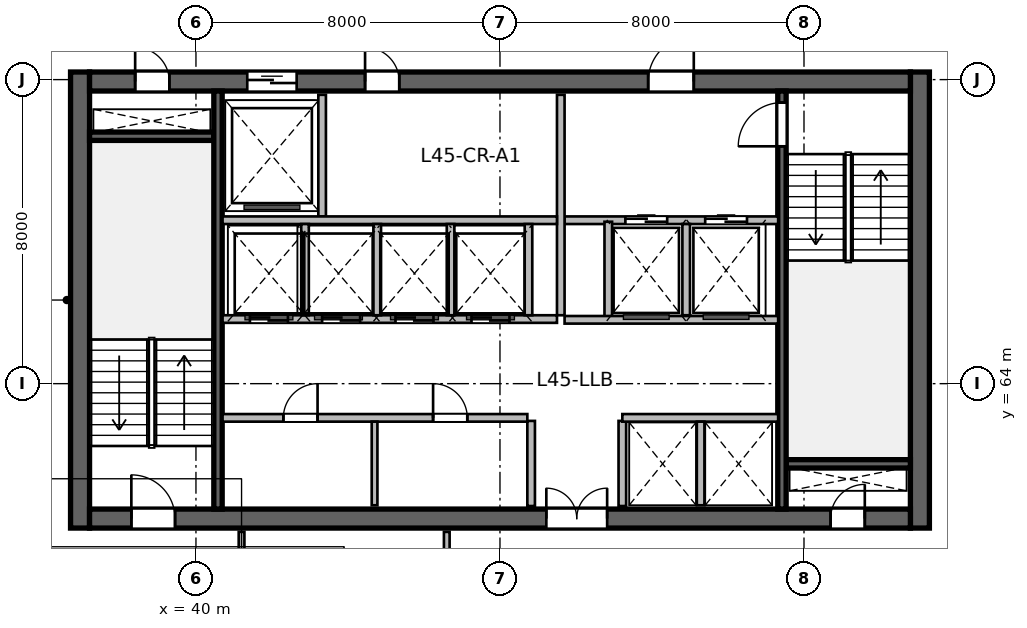
"""IFC4 building model, lengths in metres.
Left out: names, types, materials, properties, quantities, classifications, styles, units other than length and angle.
Written with IfcOpenShell. Run it as: python <this file> out.ifc"""

import sys

from ifc_helpers import new_model, si_unit, direction, frame, frame_2d, origin, place, context, subcontext, project, spatial, rectangle, extrude, source, transform, mapped, element, fill, save


model = new_model("IFC4")
c1 = context("Model", 3, precision=1e-05, world=origin(), true_north=direction((0.0, 1.0)))
c2 = subcontext(c1, "Body", "Model", "MODEL_VIEW")
j1 = project(units=[si_unit("LENGTHUNIT", "METRE"), si_unit("PLANEANGLEUNIT", "RADIAN")], contexts=[c1])
p1 = place(None, origin())
s1 = spatial("IfcSite", under=j1, at=p1, CompositionType="ELEMENT")
p2 = place(p1, origin())
s2 = spatial("IfcBuilding", under=s1, at=p2, CompositionType="ELEMENT")
p3 = place(p2, frame((0.0, 0.0, 185.7)))
s3 = spatial("IfcBuildingStorey", under=s2, at=p3, CompositionType="ELEMENT", Elevation=185.7)
m1 = source(origin(), c2, "Body", "SweptSolid", [
    extrude(rectangle(XDim=12.0, YDim=0.5, at=frame_2d((6.0, 0.0))), origin(), (0.0, 0.0, 1.0), 3.9),
])
for number, where, z_axis, x_axis in (
    (1, (36.95, 60.2, 0.0), (0.0, 0.0, 1.0), (0.0, 1.0, 0.0)),
    (2, (59.05, 60.2, 0.0), (0.0, 0.0, 1.0), (0.0, 1.0, 0.0)),
):
    element("IfcWall", number, at=place(p3, frame(where, z_axis=z_axis, x_axis=x_axis)), inside=s3, PredefinedType="SHEAR", context=c2, shape_type="MappedRepresentation", body=[
        mapped(m1, transform((0.0, 0.0, 0.0), scale=1.0)),
    ])
m2 = source(origin(), c2, "Body", "SweptSolid", [
    extrude(rectangle(XDim=21.6, YDim=0.5, at=frame_2d((10.8, 0.0))), origin(), (0.0, 0.0, 1.0), 3.9),
])
p4 = place(p3, frame((37.2, 60.45, 0.0), z_axis=(0.0, 0.0, 1.0), x_axis=(1.0, 0.0, 0.0)))
e3 = element("IfcWall", 3, at=p4, inside=s3, PredefinedType="SHEAR", context=c2, shape_type="MappedRepresentation", body=[
    mapped(m2, transform((0.0, 0.0, 0.0), scale=1.0)),
])
p5 = place(p4, frame((1.1, 0.0, 0.0)))
e4 = element("IfcOpeningElement", 4, at=p5, cuts=e3, PredefinedType="OPENING", context=c2, shape_type="SweptSolid", body=[
    extrude(rectangle(XDim=1.15, YDim=2.15, at=frame_2d((0.575, 1.075))), frame((0.0, 0.26, 0.0), z_axis=(0.0, -1.0, 0.0), x_axis=(1.0, 0.0, 0.0)), (0.0, 0.0, 1.0), 0.52),
])
p6 = place(p4, frame((19.5, 0.0, 0.0)))
e5 = element("IfcOpeningElement", 5, at=p6, cuts=e3, PredefinedType="OPENING", context=c2, shape_type="SweptSolid", body=[
    extrude(rectangle(XDim=0.9, YDim=2.1, at=frame_2d((0.45, 1.05))), frame((0.0, 0.26, 0.0), z_axis=(0.0, -1.0, 0.0), x_axis=(1.0, 0.0, 0.0)), (0.0, 0.0, 1.0), 0.52),
])
p7 = place(p4, frame((12.02, 0.0, 0.0)))
e6 = element("IfcOpeningElement", 6, at=p7, cuts=e3, PredefinedType="OPENING", context=c2, shape_type="SweptSolid", body=[
    extrude(rectangle(XDim=1.6, YDim=2.15, at=frame_2d((0.8, 1.075))), frame((0.0, 0.26, 0.0), z_axis=(0.0, -1.0, 0.0), x_axis=(1.0, 0.0, 0.0)), (0.0, 0.0, 1.0), 0.52),
])
p8 = place(p3, frame((37.2, 71.95, 0.0), z_axis=(0.0, 0.0, 1.0), x_axis=(1.0, 0.0, 0.0)))
e7 = element("IfcWall", 7, at=p8, inside=s3, PredefinedType="SHEAR", context=c2, shape_type="MappedRepresentation", body=[
    mapped(m2, transform((0.0, 0.0, 0.0), scale=1.0)),
])
p9 = place(p8, frame((1.2, 0.0, 0.0)))
e8 = element("IfcOpeningElement", 8, at=p9, cuts=e7, PredefinedType="OPENING", context=c2, shape_type="SweptSolid", body=[
    extrude(rectangle(XDim=0.9, YDim=2.1, at=frame_2d((0.45, 1.05))), frame((0.0, 0.26, 0.0), z_axis=(0.0, -1.0, 0.0), x_axis=(1.0, 0.0, 0.0)), (0.0, 0.0, 1.0), 0.52),
])
p10 = place(p8, frame((14.7, 0.0, 0.0)))
e9 = element("IfcOpeningElement", 9, at=p10, cuts=e7, PredefinedType="OPENING", context=c2, shape_type="SweptSolid", body=[
    extrude(rectangle(XDim=1.2, YDim=2.15, at=frame_2d((0.6, 1.075))), frame((0.0, 0.26, 0.0), z_axis=(0.0, -1.0, 0.0), x_axis=(1.0, 0.0, 0.0)), (0.0, 0.0, 1.0), 0.52),
])
p11 = place(p8, frame((4.15, 0.0, 0.0)))
e10 = element("IfcOpeningElement", 10, at=p11, cuts=e7, PredefinedType="OPENING", context=c2, shape_type="SweptSolid", body=[
    extrude(rectangle(XDim=1.3, YDim=2.15, at=frame_2d((0.65, 1.075))), frame((0.0, 0.26, 0.0), z_axis=(0.0, -1.0, 0.0), x_axis=(1.0, 0.0, 0.0)), (0.0, 0.0, 1.0), 0.52),
])
p12 = place(p8, frame((7.25, 0.0, 0.0)))
e11 = element("IfcOpeningElement", 11, at=p12, cuts=e7, PredefinedType="OPENING", context=c2, shape_type="SweptSolid", body=[
    extrude(rectangle(XDim=0.9, YDim=2.1, at=frame_2d((0.45, 1.05))), frame((0.0, 0.26, 0.0), z_axis=(0.0, -1.0, 0.0), x_axis=(1.0, 0.0, 0.0)), (0.0, 0.0, 1.0), 0.52),
])
m3 = source(origin(), c2, "Body", "SweptSolid", [
    extrude(rectangle(XDim=3.27, YDim=0.22, at=frame_2d((1.635, 0.0))), origin(), (0.0, 0.0, 1.0), 3.9),
])
for number, where, z_axis, x_axis in (
    (12, (37.2, 70.51, 0.0), (0.0, 0.0, 1.0), (1.0, 0.0, 0.0)),
    (13, (55.53, 61.89, 0.0), (0.0, 0.0, 1.0), (1.0, 0.0, 0.0)),
):
    element("IfcWall", number, at=place(p3, frame(where, z_axis=z_axis, x_axis=x_axis)), inside=s3, PredefinedType="SHEAR", context=c2, shape_type="MappedRepresentation", body=[
        mapped(m3, transform((0.0, 0.0, 0.0), scale=1.0)),
    ])
m4 = source(origin(), c2, "Body", "SweptSolid", [
    extrude(rectangle(XDim=11.0, YDim=0.22, at=frame_2d((5.5, 0.0))), origin(), (0.0, 0.0, 1.0), 3.9),
])
p13 = place(p3, frame((40.58, 60.7, 0.0), z_axis=(0.0, 0.0, 1.0), x_axis=(0.0, 1.0, 0.0)))
e14 = element("IfcWall", 14, at=p13, inside=s3, PredefinedType="SHEAR", context=c2, shape_type="MappedRepresentation", body=[
    mapped(m4, transform((0.0, 0.0, 0.0), scale=1.0)),
])
p14 = place(p3, frame((55.42, 60.7, 0.0), z_axis=(0.0, 0.0, 1.0), x_axis=(0.0, 1.0, 0.0)))
e15 = element("IfcWall", 15, at=p14, inside=s3, PredefinedType="SHEAR", context=c2, shape_type="MappedRepresentation", body=[
    mapped(m4, transform((0.0, 0.0, 0.0), scale=1.0)),
])
p15 = place(p14, frame((9.545, 0.0, 0.0)))
e16 = element("IfcOpeningElement", 16, at=p15, cuts=e15, PredefinedType="OPENING", context=c2, shape_type="SweptSolid", body=[
    extrude(rectangle(XDim=1.15, YDim=2.15, at=frame_2d((0.575, 1.075))), frame((0.0, 0.12, 0.0), z_axis=(0.0, -1.0, 0.0), x_axis=(1.0, 0.0, 0.0)), (0.0, 0.0, 1.0), 0.24),
])
m5 = source(origin(), c2, "Body", "SweptSolid", [
    extrude(rectangle(XDim=2.24, YDim=0.2, at=frame_2d((1.12, 0.0))), origin(), (0.0, 0.0, 1.0), 3.58),
])
for number, where, z_axis, x_axis in (
    (17, (48.82, 60.78, 0.0), (0.0, 0.0, 1.0), (0.0, 1.0, 0.0)),
    (18, (51.22, 60.78, 0.0), (0.0, 0.0, 1.0), (0.0, 1.0, 0.0)),
):
    element("IfcWall", number, at=place(p3, frame(where, z_axis=z_axis, x_axis=x_axis)), inside=s3, PredefinedType="SOLIDWALL", context=c2, shape_type="MappedRepresentation", body=[
        mapped(m5, transform((0.0, 0.0, 0.0), scale=1.0)),
    ])
m6 = source(origin(), c2, "Body", "SweptSolid", [
    extrude(rectangle(XDim=5.62, YDim=0.2, at=frame_2d((2.81, 0.0))), origin(), (0.0, 0.0, 1.0), 3.58),
])
p16 = place(p3, frame((49.7, 68.3, 0.0), z_axis=(0.0, 0.0, 1.0), x_axis=(1.0, 0.0, 0.0)))
e19 = element("IfcWall", 19, at=p16, inside=s3, PredefinedType="SOLIDWALL", context=c2, shape_type="MappedRepresentation", body=[
    mapped(m6, transform((0.0, 0.0, 0.0), scale=1.0)),
])
p17 = place(p16, frame((1.6, 0.0, 0.0)))
e20 = element("IfcOpeningElement", 20, at=p17, cuts=e19, PredefinedType="OPENING", context=c2, shape_type="SweptSolid", body=[
    extrude(rectangle(XDim=1.1, YDim=2.15, at=frame_2d((0.55, 1.075))), frame((0.0, 0.11, 0.0), z_axis=(0.0, -1.0, 0.0), x_axis=(1.0, 0.0, 0.0)), (0.0, 0.0, 1.0), 0.22),
])
p18 = place(p16, frame((3.7, 0.0, 0.0)))
e21 = element("IfcOpeningElement", 21, at=p18, cuts=e19, PredefinedType="OPENING", context=c2, shape_type="SweptSolid", body=[
    extrude(rectangle(XDim=1.1, YDim=2.15, at=frame_2d((0.55, 1.075))), frame((0.0, 0.11, 0.0), z_axis=(0.0, -1.0, 0.0), x_axis=(1.0, 0.0, 0.0)), (0.0, 0.0, 1.0), 0.22),
])
m7 = source(origin(), c2, "Body", "SweptSolid", [
    extrude(rectangle(XDim=5.8, YDim=0.2, at=frame_2d((2.9, 0.0))), origin(), (0.0, 0.0, 1.0), 3.58),
])
p19 = place(p3, frame((49.6, 65.8, 0.0), z_axis=(0.0, 0.0, 1.0), x_axis=(0.0, 1.0, 0.0)))
e22 = element("IfcWall", 22, at=p19, inside=s3, PredefinedType="SOLIDWALL", context=c2, shape_type="MappedRepresentation", body=[
    mapped(m7, transform((0.0, 0.0, 0.0), scale=1.0)),
])
m8 = source(origin(), c2, "Body", "SweptSolid", [
    extrude(rectangle(XDim=2.58, YDim=0.2, at=frame_2d((1.29, 0.0))), origin(), (0.0, 0.0, 1.0), 3.58),
])
p20 = place(p3, frame((50.85, 65.68, 0.0), z_axis=(0.0, 0.0, 1.0), x_axis=(0.0, 1.0, 0.0)))
e23 = element("IfcWall", 23, at=p20, inside=s3, PredefinedType="SOLIDWALL", context=c2, shape_type="MappedRepresentation", body=[
    mapped(m8, transform((0.0, 0.0, 0.0), scale=1.0)),
])
m9 = source(origin(), c2, "Body", "SweptSolid", [
    extrude(rectangle(XDim=2.4, YDim=0.2, at=frame_2d((1.2, 0.0))), origin(), (0.0, 0.0, 1.0), 3.58),
])
p21 = place(p3, frame((52.9, 65.8, 0.0), z_axis=(0.0, 0.0, 1.0), x_axis=(0.0, 1.0, 0.0)))
e24 = element("IfcWall", 24, at=p21, inside=s3, PredefinedType="SOLIDWALL", context=c2, shape_type="MappedRepresentation", body=[
    mapped(m9, transform((0.0, 0.0, 0.0), scale=1.0)),
])
p22 = place(p3, frame((49.7, 65.68, 0.0), z_axis=(0.0, 0.0, 1.0), x_axis=(1.0, 0.0, 0.0)))
e25 = element("IfcWall", 25, at=p22, inside=s3, PredefinedType="SOLIDWALL", context=c2, shape_type="MappedRepresentation", body=[
    mapped(m6, transform((0.0, 0.0, 0.0), scale=1.0)),
])
m10 = source(origin(), c2, "Body", "SweptSolid", [
    extrude(rectangle(XDim=3.2, YDim=0.2, at=frame_2d((1.6, 0.0))), origin(), (0.0, 0.0, 1.0), 3.58),
])
p23 = place(p3, frame((43.32, 68.4, 0.0), z_axis=(0.0, 0.0, 1.0), x_axis=(0.0, 1.0, 0.0)))
e26 = element("IfcWall", 26, at=p23, inside=s3, PredefinedType="SOLIDWALL", context=c2, shape_type="MappedRepresentation", body=[
    mapped(m10, transform((0.0, 0.0, 0.0), scale=1.0)),
])
m11 = source(origin(), c2, "Body", "SweptSolid", [
    extrude(rectangle(XDim=8.8, YDim=0.2, at=frame_2d((4.4, 0.0))), origin(), (0.0, 0.0, 1.0), 3.58),
])
p24 = place(p3, frame((40.7, 68.3, 0.0), z_axis=(0.0, 0.0, 1.0), x_axis=(1.0, 0.0, 0.0)))
e27 = element("IfcWall", 27, at=p24, inside=s3, PredefinedType="SOLIDWALL", context=c2, shape_type="MappedRepresentation", body=[
    mapped(m11, transform((0.0, 0.0, 0.0), scale=1.0)),
])
m12 = source(origin(), c2, "Body", "SweptSolid", [
    extrude(rectangle(XDim=8.02, YDim=0.2, at=frame_2d((4.01, 0.0))), origin(), (0.0, 0.0, 1.0), 3.58),
])
p25 = place(p3, frame((40.7, 63.1, 0.0), z_axis=(0.0, 0.0, 1.0), x_axis=(1.0, 0.0, 0.0)))
e28 = element("IfcWall", 28, at=p25, inside=s3, PredefinedType="SOLIDWALL", context=c2, shape_type="MappedRepresentation", body=[
    mapped(m12, transform((0.0, 0.0, 0.0), scale=1.0)),
])
p26 = place(p25, frame((1.6, 0.0, 0.0)))
e29 = element("IfcOpeningElement", 29, at=p26, cuts=e28, PredefinedType="OPENING", context=c2, shape_type="SweptSolid", body=[
    extrude(rectangle(XDim=0.9, YDim=2.1, at=frame_2d((0.45, 1.05))), frame((0.0, 0.11, 0.0), z_axis=(0.0, -1.0, 0.0), x_axis=(1.0, 0.0, 0.0)), (0.0, 0.0, 1.0), 0.22),
])
p27 = place(p25, frame((5.54, 0.0, 0.0)))
e30 = element("IfcOpeningElement", 30, at=p27, cuts=e28, PredefinedType="OPENING", context=c2, shape_type="SweptSolid", body=[
    extrude(rectangle(XDim=0.9, YDim=2.1, at=frame_2d((0.45, 1.05))), frame((0.0, 0.11, 0.0), z_axis=(0.0, -1.0, 0.0), x_axis=(1.0, 0.0, 0.0)), (0.0, 0.0, 1.0), 0.22),
])
m13 = source(origin(), c2, "Body", "SweptSolid", [
    extrude(rectangle(XDim=4.1, YDim=0.2, at=frame_2d((2.05, 0.0))), origin(), (0.0, 0.0, 1.0), 3.58),
])
p28 = place(p3, frame((51.22, 63.1, 0.0), z_axis=(0.0, 0.0, 1.0), x_axis=(1.0, 0.0, 0.0)))
e31 = element("IfcWall", 31, at=p28, inside=s3, PredefinedType="SOLIDWALL", context=c2, shape_type="MappedRepresentation", body=[
    mapped(m13, transform((0.0, 0.0, 0.0), scale=1.0)),
])
m14 = source(origin(), c2, "Body", "SweptSolid", [
    extrude(rectangle(XDim=2.2, YDim=0.15, at=frame_2d((1.1, 0.0))), origin(), (0.0, 0.0, 1.0), 3.58),
])
p29 = place(p3, frame((44.7, 60.8, 0.0), z_axis=(0.0, 0.0, 1.0), x_axis=(0.0, 1.0, 0.0)))
e32 = element("IfcWall", 32, at=p29, inside=s3, PredefinedType="PARTITIONING", context=c2, shape_type="MappedRepresentation", body=[
    mapped(m14, transform((0.0, 0.0, 0.0), scale=1.0)),
])
m15 = source(origin(), c2, "Body", "SweptSolid", [
    extrude(rectangle(XDim=2.2, YDim=0.2, at=frame_2d((1.1, 0.0))), origin(), (0.0, 0.0, 1.0), 3.58),
])
p30 = place(p3, frame((53.28, 60.8, 0.0), z_axis=(0.0, 0.0, 1.0), x_axis=(0.0, 1.0, 0.0)))
e33 = element("IfcWall", 33, at=p30, inside=s3, PredefinedType="SOLIDWALL", context=c2, shape_type="MappedRepresentation", body=[
    mapped(m15, transform((0.0, 0.0, 0.0), scale=1.0)),
])
p31 = place(p3, frame((40.7, 65.7, 0.0), z_axis=(0.0, 0.0, 1.0), x_axis=(1.0, 0.0, 0.0)))
e34 = element("IfcWall", 34, at=p31, inside=s3, PredefinedType="SOLIDWALL", context=c2, shape_type="MappedRepresentation", body=[
    mapped(m11, transform((0.0, 0.0, 0.0), scale=1.0)),
])
p32 = place(p31, frame((0.72, 0.0, 0.0)))
e35 = element("IfcOpeningElement", 35, at=p32, cuts=e34, PredefinedType="OPENING", context=c2, shape_type="SweptSolid", body=[
    extrude(rectangle(XDim=1.0, YDim=2.15, at=frame_2d((0.5, 1.075))), frame((0.0, 0.11, 0.0), z_axis=(0.0, -1.0, 0.0), x_axis=(1.0, 0.0, 0.0)), (0.0, 0.0, 1.0), 0.22),
])
p33 = place(p31, frame((2.62, 0.0, 0.0)))
e36 = element("IfcOpeningElement", 36, at=p33, cuts=e34, PredefinedType="OPENING", context=c2, shape_type="SweptSolid", body=[
    extrude(rectangle(XDim=1.0, YDim=2.15, at=frame_2d((0.5, 1.075))), frame((0.0, 0.11, 0.0), z_axis=(0.0, -1.0, 0.0), x_axis=(1.0, 0.0, 0.0)), (0.0, 0.0, 1.0), 0.22),
])
p34 = place(p31, frame((4.55, 0.0, 0.0)))
e37 = element("IfcOpeningElement", 37, at=p34, cuts=e34, PredefinedType="OPENING", context=c2, shape_type="SweptSolid", body=[
    extrude(rectangle(XDim=1.0, YDim=2.15, at=frame_2d((0.5, 1.075))), frame((0.0, 0.11, 0.0), z_axis=(0.0, -1.0, 0.0), x_axis=(1.0, 0.0, 0.0)), (0.0, 0.0, 1.0), 0.22),
])
p35 = place(p31, frame((6.55, 0.0, 0.0)))
e38 = element("IfcOpeningElement", 38, at=p35, cuts=e34, PredefinedType="OPENING", context=c2, shape_type="SweptSolid", body=[
    extrude(rectangle(XDim=1.0, YDim=2.15, at=frame_2d((0.5, 1.075))), frame((0.0, 0.11, 0.0), z_axis=(0.0, -1.0, 0.0), x_axis=(1.0, 0.0, 0.0)), (0.0, 0.0, 1.0), 0.22),
])
for number, where, z_axis, x_axis in (
    (39, (48.75, 65.8, 0.0), (0.0, 0.0, 1.0), (0.0, 1.0, 0.0)),
    (40, (42.87, 65.8, 0.0), (0.0, 0.0, 1.0), (0.0, 1.0, 0.0)),
    (41, (44.77, 65.8, 0.0), (0.0, 0.0, 1.0), (0.0, 1.0, 0.0)),
    (42, (46.7, 65.8, 0.0), (0.0, 0.0, 1.0), (0.0, 1.0, 0.0)),
):
    element("IfcWall", number, at=place(p3, frame(where, z_axis=z_axis, x_axis=x_axis)), inside=s3, PredefinedType="SOLIDWALL", context=c2, shape_type="MappedRepresentation", body=[
        mapped(m9, transform((0.0, 0.0, 0.0), scale=1.0)),
    ])
m16 = source(origin(), c2, "Body", "SweptSolid", [
    extrude(rectangle(XDim=2.033, YDim=0.15, at=frame_2d((1.016, 0.0))), origin(), (0.0, 0.0, 1.0), 3.58),
])
p36 = place(p3, frame((41.2, 58.067, 0.0), z_axis=(0.0, 0.0, 1.0), x_axis=(0.0, 1.0, 0.0)))
e43 = element("IfcWall", 43, at=p36, inside=s3, PredefinedType="PARTITIONING", context=c2, shape_type="MappedRepresentation", body=[
    mapped(m16, transform((0.0, 0.0, 0.0), scale=1.0)),
])
p37 = place(p36, frame((0.591, 0.0, 0.0)))
e44 = element("IfcOpeningElement", 44, at=p37, cuts=e43, PredefinedType="OPENING", context=c2, shape_type="SweptSolid", body=[
    extrude(rectangle(XDim=0.85, YDim=2.1, at=frame_2d((0.425, 1.05))), frame((0.0, 0.085, 0.0), z_axis=(0.0, -1.0, 0.0), x_axis=(1.0, 0.0, 0.0)), (0.0, 0.0, 1.0), 0.17),
])
p38 = place(p3, frame((46.6, 58.067, 0.0), z_axis=(0.0, 0.0, 1.0), x_axis=(0.0, 1.0, 0.0)))
e45 = element("IfcWall", 45, at=p38, inside=s3, PredefinedType="PARTITIONING", context=c2, shape_type="MappedRepresentation", body=[
    mapped(m16, transform((0.0, 0.0, 0.0), scale=1.0)),
])
m17 = source(origin(), c2, "Body", "SweptSolid", [
    extrude(rectangle(XDim=1.15, YDim=2.15, at=frame_2d((0.575, 1.075))), frame((0.0, 0.025, 0.0), z_axis=(0.0, -1.0, 0.0), x_axis=(1.0, 0.0, 0.0)), (0.0, 0.0, 1.0), 0.05),
])
p39 = place(p5, origin())
e46 = element("IfcDoor", 46, at=p39, inside=s3, OperationType="SINGLE_SWING_LEFT", PredefinedType="DOOR", context=c2, shape_type="MappedRepresentation", body=[
    mapped(m17, transform((0.0, 0.0, 0.0), scale=1.0)),
])
fill(e4, e46)
m18 = source(origin(), c2, "Body", "SweptSolid", [
    extrude(rectangle(XDim=0.9, YDim=2.1, at=frame_2d((0.45, 1.05))), frame((0.0, 0.025, 0.0), z_axis=(0.0, -1.0, 0.0), x_axis=(1.0, 0.0, 0.0)), (0.0, 0.0, 1.0), 0.05),
])
p40 = place(p9, origin())
e47 = element("IfcDoor", 47, at=p40, inside=s3, OperationType="SINGLE_SWING_LEFT", PredefinedType="DOOR", context=c2, shape_type="MappedRepresentation", body=[
    mapped(m18, transform((0.0, 0.0, 0.0), scale=1.0)),
])
fill(e8, e47)
p41 = place(p6, origin())
e48 = element("IfcDoor", 48, at=p41, inside=s3, OperationType="SINGLE_SWING_RIGHT", PredefinedType="DOOR", context=c2, shape_type="MappedRepresentation", body=[
    mapped(m18, transform((0.0, 0.0, 0.0), scale=1.0)),
])
fill(e5, e48)
p42 = place(p15, origin())
e49 = element("IfcDoor", 49, at=p42, inside=s3, OperationType="SINGLE_SWING_LEFT", PredefinedType="DOOR", context=c2, shape_type="MappedRepresentation", body=[
    mapped(m17, transform((0.0, 0.0, 0.0), scale=1.0)),
])
fill(e16, e49)
m19 = source(origin(), c2, "Body", "SweptSolid", [
    extrude(rectangle(XDim=1.6, YDim=2.15, at=frame_2d((0.8, 1.075))), frame((0.0, 0.025, 0.0), z_axis=(0.0, -1.0, 0.0), x_axis=(1.0, 0.0, 0.0)), (0.0, 0.0, 1.0), 0.05),
])
p43 = place(p7, origin())
e50 = element("IfcDoor", 50, at=p43, inside=s3, OperationType="DOUBLE_DOOR_SINGLE_SWING", PredefinedType="DOOR", context=c2, shape_type="MappedRepresentation", body=[
    mapped(m19, transform((0.0, 0.0, 0.0), scale=1.0)),
])
fill(e6, e50)
m20 = source(origin(), c2, "Body", "SweptSolid", [
    extrude(rectangle(XDim=1.2, YDim=2.15, at=frame_2d((0.6, 1.075))), frame((0.0, 0.025, 0.0), z_axis=(0.0, -1.0, 0.0), x_axis=(1.0, 0.0, 0.0)), (0.0, 0.0, 1.0), 0.05),
])
p44 = place(p10, origin())
e51 = element("IfcDoor", 51, at=p44, inside=s3, OperationType="SINGLE_SWING_RIGHT", PredefinedType="DOOR", context=c2, shape_type="MappedRepresentation", body=[
    mapped(m20, transform((0.0, 0.0, 0.0), scale=1.0)),
])
fill(e9, e51)
m21 = source(origin(), c2, "Body", "SweptSolid", [
    extrude(rectangle(XDim=1.1, YDim=2.15, at=frame_2d((0.55, 1.075))), frame((0.0, 0.025, 0.0), z_axis=(0.0, -1.0, 0.0), x_axis=(1.0, 0.0, 0.0)), (0.0, 0.0, 1.0), 0.05),
])
p45 = place(p17, origin())
e52 = element("IfcDoor", 52, at=p45, inside=s3, OperationType="DOUBLE_DOOR_SLIDING", PredefinedType="DOOR", context=c2, shape_type="MappedRepresentation", body=[
    mapped(m21, transform((0.0, 0.0, 0.0), scale=1.0)),
])
fill(e20, e52)
p46 = place(p18, origin())
e53 = element("IfcDoor", 53, at=p46, inside=s3, OperationType="DOUBLE_DOOR_SLIDING", PredefinedType="DOOR", context=c2, shape_type="MappedRepresentation", body=[
    mapped(m21, transform((0.0, 0.0, 0.0), scale=1.0)),
])
fill(e21, e53)
m22 = source(origin(), c2, "Body", "SweptSolid", [
    extrude(rectangle(XDim=1.3, YDim=2.15, at=frame_2d((0.65, 1.075))), frame((0.0, 0.025, 0.0), z_axis=(0.0, -1.0, 0.0), x_axis=(1.0, 0.0, 0.0)), (0.0, 0.0, 1.0), 0.05),
])
p47 = place(p11, origin())
e54 = element("IfcDoor", 54, at=p47, inside=s3, OperationType="DOUBLE_DOOR_SLIDING", PredefinedType="DOOR", context=c2, shape_type="MappedRepresentation", body=[
    mapped(m22, transform((0.0, 0.0, 0.0), scale=1.0)),
])
fill(e10, e54)
p48 = place(p12, origin())
e55 = element("IfcDoor", 55, at=p48, inside=s3, OperationType="SINGLE_SWING_LEFT", PredefinedType="DOOR", context=c2, shape_type="MappedRepresentation", body=[
    mapped(m18, transform((0.0, 0.0, 0.0), scale=1.0)),
])
fill(e11, e55)
p49 = place(p26, origin())
e56 = element("IfcDoor", 56, at=p49, inside=s3, OperationType="SINGLE_SWING_RIGHT", PredefinedType="DOOR", context=c2, shape_type="MappedRepresentation", body=[
    mapped(m18, transform((0.0, 0.0, 0.0), scale=1.0)),
])
fill(e29, e56)
p50 = place(p27, origin())
e57 = element("IfcDoor", 57, at=p50, inside=s3, OperationType="SINGLE_SWING_LEFT", PredefinedType="DOOR", context=c2, shape_type="MappedRepresentation", body=[
    mapped(m18, transform((0.0, 0.0, 0.0), scale=1.0)),
])
fill(e30, e57)
m23 = source(origin(), c2, "Body", "SweptSolid", [
    extrude(rectangle(XDim=1.0, YDim=2.15, at=frame_2d((0.5, 1.075))), frame((0.0, 0.025, 0.0), z_axis=(0.0, -1.0, 0.0), x_axis=(1.0, 0.0, 0.0)), (0.0, 0.0, 1.0), 0.05),
])
p51 = place(p32, origin())
e58 = element("IfcDoor", 58, at=p51, inside=s3, OperationType="DOUBLE_DOOR_SLIDING", PredefinedType="DOOR", context=c2, shape_type="MappedRepresentation", body=[
    mapped(m23, transform((0.0, 0.0, 0.0), scale=1.0)),
])
fill(e35, e58)
p52 = place(p33, origin())
e59 = element("IfcDoor", 59, at=p52, inside=s3, OperationType="DOUBLE_DOOR_SLIDING", PredefinedType="DOOR", context=c2, shape_type="MappedRepresentation", body=[
    mapped(m23, transform((0.0, 0.0, 0.0), scale=1.0)),
])
fill(e36, e59)
p53 = place(p34, origin())
e60 = element("IfcDoor", 60, at=p53, inside=s3, OperationType="DOUBLE_DOOR_SLIDING", PredefinedType="DOOR", context=c2, shape_type="MappedRepresentation", body=[
    mapped(m23, transform((0.0, 0.0, 0.0), scale=1.0)),
])
fill(e37, e60)
p54 = place(p35, origin())
e61 = element("IfcDoor", 61, at=p54, inside=s3, OperationType="DOUBLE_DOOR_SLIDING", PredefinedType="DOOR", context=c2, shape_type="MappedRepresentation", body=[
    mapped(m23, transform((0.0, 0.0, 0.0), scale=1.0)),
])
fill(e38, e61)
save(model, sys.argv[1])
